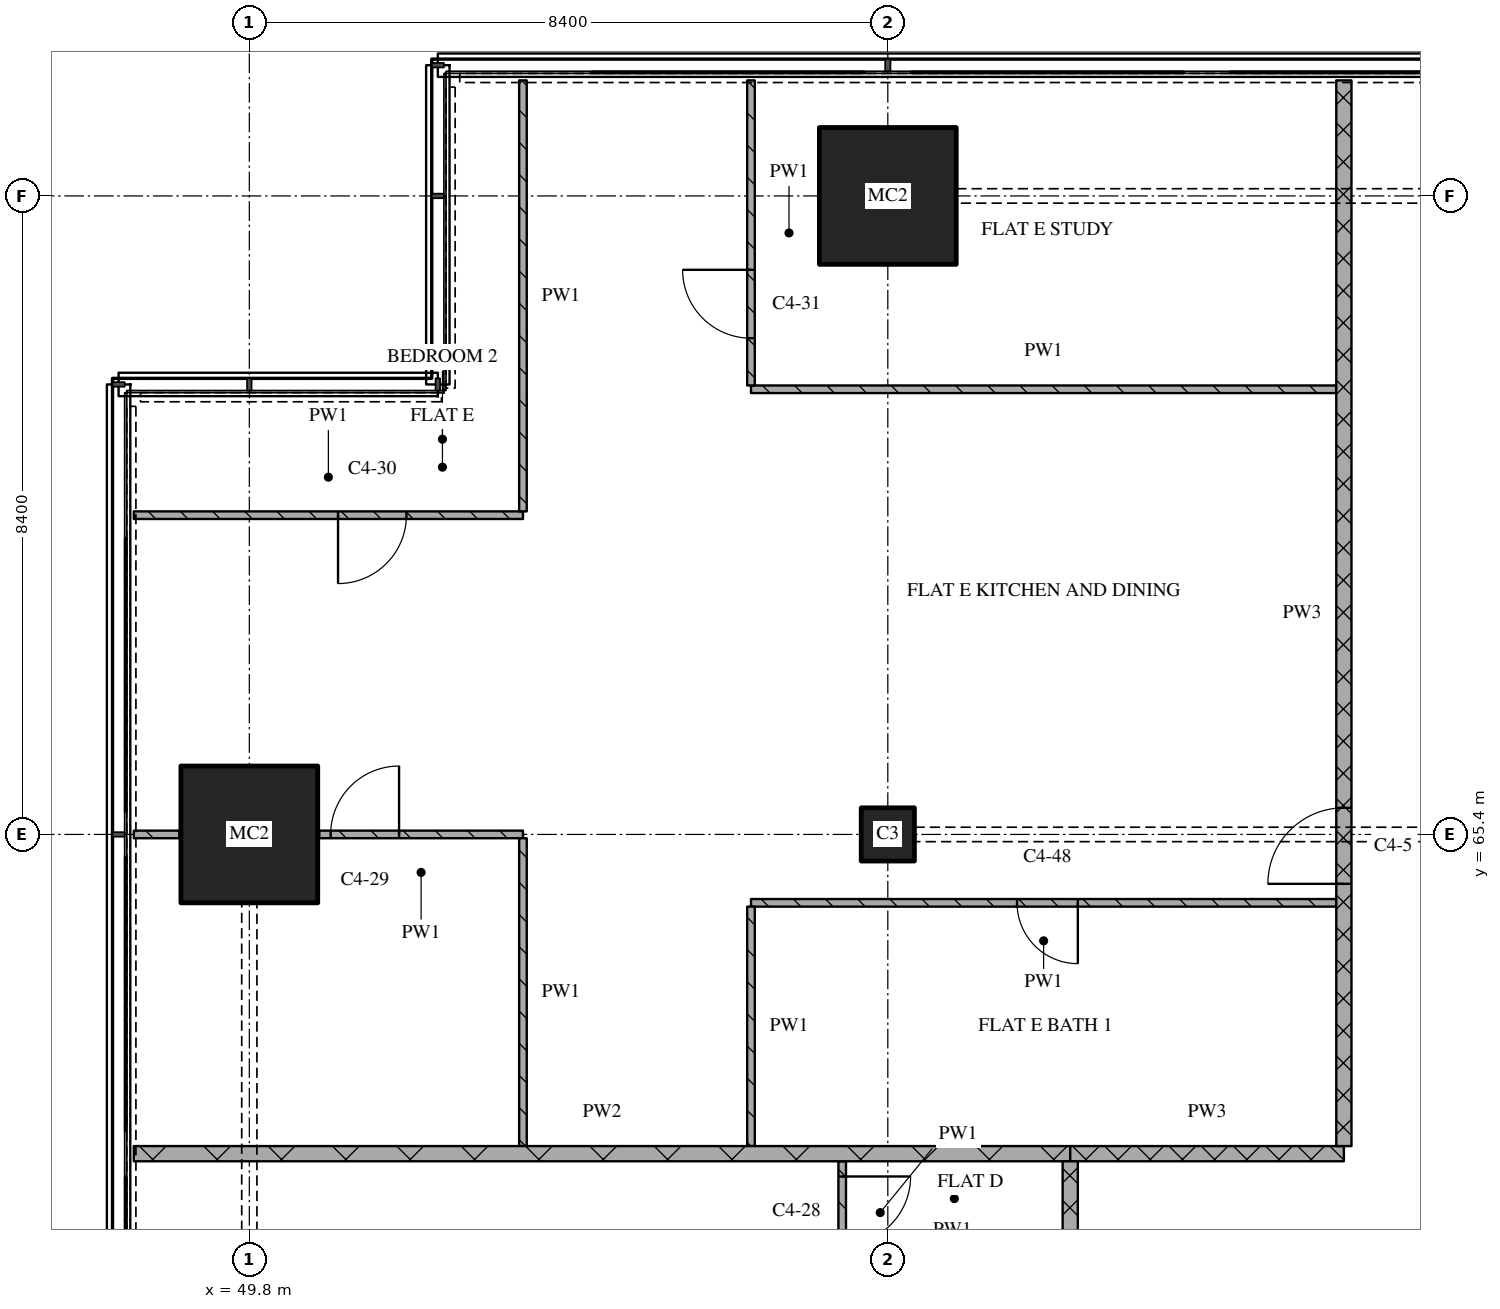
"""IFC4 building model, lengths in metres.
Left out: names, types, materials, properties, quantities, classifications, styles, units other than length and angle.
Written with IfcOpenShell. Run it as: python <this file> out.ifc"""

import sys

from ifc_helpers import new_model, si_unit, direction, frame, frame_2d, origin, origin_2d, place, context, subcontext, project, spatial, rectangle, extrude, element, fill, save


model = new_model("IFC4")
c1 = context("Model", 3, precision=1e-05, world=origin(), true_north=direction((0.0, 1.0)))
c2 = subcontext(c1, "Body", "Model", "MODEL_VIEW")
j1 = project(units=[si_unit("LENGTHUNIT", "METRE"), si_unit("PLANEANGLEUNIT", "RADIAN")], contexts=[c1])
p1 = place(None, origin())
s1 = spatial("IfcSite", under=j1, at=p1, CompositionType="ELEMENT")
p2 = place(p1, origin())
s2 = spatial("IfcBuilding", under=s1, at=p2, CompositionType="ELEMENT")
p3 = place(p2, frame((0.0, 0.0, 187.05)))
s3 = spatial("IfcBuildingStorey", under=s2, at=p3, CompositionType="ELEMENT", Elevation=187.05)
p4 = place(p3, frame((49.8, 65.4, 0.0), z_axis=(0.0, 0.0, 1.0), x_axis=(1.0, 0.0, 0.0)))
e1 = element("IfcColumn", 1, at=p4, inside=s3, PredefinedType="COLUMN", context=c2, shape_type="SweptSolid", body=[
    extrude(rectangle(XDim=1.8, YDim=1.8, at=origin_2d()), origin(), (0.0, 0.0, 1.0), 3.6),
])
p5 = place(p3, frame((58.2, 65.4, 0.0), z_axis=(0.0, 0.0, 1.0), x_axis=(1.0, 0.0, 0.0)))
e2 = element("IfcColumn", 2, at=p5, inside=s3, PredefinedType="COLUMN", context=c2, shape_type="SweptSolid", body=[
    extrude(rectangle(XDim=0.7, YDim=0.7, at=origin_2d()), origin(), (0.0, 0.0, 1.0), 3.6),
])
p6 = place(p3, frame((58.2, 73.8, 0.0), z_axis=(0.0, 0.0, 1.0), x_axis=(1.0, 0.0, 0.0)))
e3 = element("IfcColumn", 3, at=p6, inside=s3, PredefinedType="COLUMN", context=c2, shape_type="SweptSolid", body=[
    extrude(rectangle(XDim=1.8, YDim=1.8, at=origin_2d()), origin(), (0.0, 0.0, 1.0), 3.6),
])
p7 = place(p3, frame((60.6, 61.2, 0.0), z_axis=(0.0, 0.0, 1.0), x_axis=(1.0, 0.0, 0.0)))
e4 = element("IfcWall", 4, at=p7, inside=s3, PredefinedType="PARTITIONING", context=c2, shape_type="SweptSolid", body=[
    extrude(rectangle(XDim=3.6, YDim=0.2, at=frame_2d((1.8, 0.0))), origin(), (0.0, 0.0, 1.0), 3.32),
])
p8 = place(p3, frame((48.28, 61.2, 0.0), z_axis=(0.0, 0.0, 1.0), x_axis=(1.0, 0.0, 0.0)))
e5 = element("IfcWall", 5, at=p8, inside=s3, PredefinedType="PARTITIONING", context=c2, shape_type="SweptSolid", body=[
    extrude(rectangle(XDim=12.32, YDim=0.2, at=frame_2d((6.16, 0.0))), origin(), (0.0, 0.0, 1.0), 3.32),
])
p9 = place(p3, frame((64.1, 64.5, 0.0), z_axis=(0.0, 0.0, 1.0), x_axis=(-1.0, 0.0, 0.0)))
e6 = element("IfcWall", 6, at=p9, inside=s3, PredefinedType="PARTITIONING", context=c2, shape_type="SweptSolid", body=[
    extrude(rectangle(XDim=7.7, YDim=0.1, at=frame_2d((3.85, 0.0))), origin(), (0.0, 0.0, 1.0), 3.32),
])
p10 = place(p9, frame((3.4, 0.0, 0.0)))
e7 = element("IfcOpeningElement", 7, at=p10, cuts=e6, PredefinedType="OPENING", context=c2, shape_type="SweptSolid", body=[
    extrude(rectangle(XDim=0.8, YDim=2.1, at=frame_2d((0.4, 1.05))), frame((0.0, 0.06, 0.0), z_axis=(0.0, -1.0, 0.0), x_axis=(1.0, 0.0, 0.0)), (0.0, 0.0, 1.0), 0.12),
])
p11 = place(p3, frame((48.28, 65.4, 0.0), z_axis=(0.0, 0.0, 1.0), x_axis=(1.0, 0.0, 0.0)))
e8 = element("IfcWall", 8, at=p11, inside=s3, PredefinedType="PARTITIONING", context=c2, shape_type="SweptSolid", body=[
    extrude(rectangle(XDim=0.6, YDim=0.1, at=frame_2d((0.3, 0.0))), origin(), (0.0, 0.0, 1.0), 3.32),
])
p12 = place(p3, frame((53.4, 65.4, 0.0), z_axis=(0.0, 0.0, 1.0), x_axis=(-1.0, 0.0, 0.0)))
e9 = element("IfcWall", 9, at=p12, inside=s3, PredefinedType="PARTITIONING", context=c2, shape_type="SweptSolid", body=[
    extrude(rectangle(XDim=2.68, YDim=0.1, at=frame_2d((1.34, 0.0))), origin(), (0.0, 0.0, 1.0), 3.32),
])
p13 = place(p12, frame((1.63, 0.0, 0.0)))
e10 = element("IfcOpeningElement", 10, at=p13, cuts=e9, PredefinedType="OPENING", context=c2, shape_type="SweptSolid", body=[
    extrude(rectangle(XDim=0.9, YDim=2.1, at=frame_2d((0.45, 1.05))), frame((0.0, 0.06, 0.0), z_axis=(0.0, -1.0, 0.0), x_axis=(1.0, 0.0, 0.0)), (0.0, 0.0, 1.0), 0.12),
])
p14 = place(p3, frame((48.28, 69.6, 0.0), z_axis=(0.0, 0.0, 1.0), x_axis=(1.0, 0.0, 0.0)))
e11 = element("IfcWall", 11, at=p14, inside=s3, PredefinedType="PARTITIONING", context=c2, shape_type="SweptSolid", body=[
    extrude(rectangle(XDim=5.12, YDim=0.1, at=frame_2d((2.56, 0.0))), origin(), (0.0, 0.0, 1.0), 3.32),
])
p15 = place(p14, frame((2.687, 0.0, 0.0)))
e12 = element("IfcOpeningElement", 12, at=p15, cuts=e11, PredefinedType="OPENING", context=c2, shape_type="SweptSolid", body=[
    extrude(rectangle(XDim=0.9, YDim=2.1, at=frame_2d((0.45, 1.05))), frame((0.0, 0.06, 0.0), z_axis=(0.0, -1.0, 0.0), x_axis=(1.0, 0.0, 0.0)), (0.0, 0.0, 1.0), 0.12),
])
p16 = place(p3, frame((56.4, 71.256, 0.0), z_axis=(0.0, 0.0, 1.0), x_axis=(1.0, 0.0, 0.0)))
e13 = element("IfcWall", 13, at=p16, inside=s3, PredefinedType="PARTITIONING", context=c2, shape_type="SweptSolid", body=[
    extrude(rectangle(XDim=7.7, YDim=0.1, at=frame_2d((3.85, 0.0))), origin(), (0.0, 0.0, 1.0), 3.32),
])
p17 = place(p3, frame((53.4, 65.35, 0.0), z_axis=(0.0, 0.0, 1.0), x_axis=(0.0, -1.0, 0.0)))
e14 = element("IfcWall", 14, at=p17, inside=s3, PredefinedType="PARTITIONING", context=c2, shape_type="SweptSolid", body=[
    extrude(rectangle(XDim=4.05, YDim=0.1, at=frame_2d((2.025, 0.0))), origin(), (0.0, 0.0, 1.0), 3.32),
])
p18 = place(p3, frame((53.4, 75.32, 0.0), z_axis=(0.0, 0.0, 1.0), x_axis=(0.0, -1.0, 0.0)))
e15 = element("IfcWall", 15, at=p18, inside=s3, PredefinedType="PARTITIONING", context=c2, shape_type="SweptSolid", body=[
    extrude(rectangle(XDim=5.67, YDim=0.1, at=frame_2d((2.835, 0.0))), origin(), (0.0, 0.0, 1.0), 3.32),
])
p19 = place(p3, frame((56.4, 64.45, 0.0), z_axis=(0.0, 0.0, 1.0), x_axis=(0.0, -1.0, 0.0)))
e16 = element("IfcWall", 16, at=p19, inside=s3, PredefinedType="PARTITIONING", context=c2, shape_type="SweptSolid", body=[
    extrude(rectangle(XDim=3.15, YDim=0.1, at=frame_2d((1.575, 0.0))), origin(), (0.0, 0.0, 1.0), 3.32),
])
p20 = place(p3, frame((56.4, 75.32, 0.0), z_axis=(0.0, 0.0, 1.0), x_axis=(0.0, -1.0, 0.0)))
e17 = element("IfcWall", 17, at=p20, inside=s3, PredefinedType="PARTITIONING", context=c2, shape_type="SweptSolid", body=[
    extrude(rectangle(XDim=4.014, YDim=0.1, at=frame_2d((2.007, 0.0))), origin(), (0.0, 0.0, 1.0), 3.32),
])
p21 = place(p20, frame((2.492, 0.0, 0.0)))
e18 = element("IfcOpeningElement", 18, at=p21, cuts=e17, PredefinedType="OPENING", context=c2, shape_type="SweptSolid", body=[
    extrude(rectangle(XDim=0.9, YDim=2.1, at=frame_2d((0.45, 1.05))), frame((0.0, 0.06, 0.0), z_axis=(0.0, -1.0, 0.0), x_axis=(1.0, 0.0, 0.0)), (0.0, 0.0, 1.0), 0.12),
])
p22 = place(p3, frame((57.6, 61.1, 0.0), z_axis=(0.0, 0.0, 1.0), x_axis=(0.0, -1.0, 0.0)))
e19 = element("IfcWall", 19, at=p22, inside=s3, PredefinedType="PARTITIONING", context=c2, shape_type="SweptSolid", body=[
    extrude(rectangle(XDim=1.35, YDim=0.1, at=frame_2d((0.675, 0.0))), origin(), (0.0, 0.0, 1.0), 3.32),
])
p23 = place(p22, frame((0.2, 0.0, 0.0)))
e20 = element("IfcOpeningElement", 20, at=p23, cuts=e19, PredefinedType="OPENING", context=c2, shape_type="SweptSolid", body=[
    extrude(rectangle(XDim=0.9, YDim=2.1, at=frame_2d((0.45, 1.05))), frame((0.0, 0.06, 0.0), z_axis=(0.0, -1.0, 0.0), x_axis=(1.0, 0.0, 0.0)), (0.0, 0.0, 1.0), 0.12),
])
p24 = place(p3, frame((60.6, 43.3, 0.0), z_axis=(0.0, 0.0, 1.0), x_axis=(0.0, 1.0, 0.0)))
e21 = element("IfcWall", 21, at=p24, inside=s3, PredefinedType="PARTITIONING", context=c2, shape_type="SweptSolid", body=[
    extrude(rectangle(XDim=17.8, YDim=0.2, at=frame_2d((8.9, 0.0))), origin(), (0.0, 0.0, 1.0), 3.32),
])
p25 = place(p24, frame((7.65, 0.0, 0.0)))
e22 = element("IfcOpeningElement", 22, at=p25, cuts=e21, PredefinedType="OPENING", context=c2, shape_type="SweptSolid", body=[
    extrude(rectangle(XDim=1.0, YDim=2.1, at=frame_2d((0.5, 1.05))), frame((0.0, 0.11, 0.0), z_axis=(0.0, -1.0, 0.0), x_axis=(1.0, 0.0, 0.0)), (0.0, 0.0, 1.0), 0.22),
])
p26 = place(p3, frame((64.2, 61.3, 0.0), z_axis=(0.0, 0.0, 1.0), x_axis=(0.0, 1.0, 0.0)))
e23 = element("IfcWall", 23, at=p26, inside=s3, PredefinedType="PARTITIONING", context=c2, shape_type="SweptSolid", body=[
    extrude(rectangle(XDim=14.02, YDim=0.2, at=frame_2d((7.01, 0.0))), origin(), (0.0, 0.0, 1.0), 3.32),
])
p27 = place(p26, frame((3.45, 0.0, 0.0)))
e24 = element("IfcOpeningElement", 24, at=p27, cuts=e23, PredefinedType="OPENING", context=c2, shape_type="SweptSolid", body=[
    extrude(rectangle(XDim=1.0, YDim=2.1, at=frame_2d((0.5, 1.05))), frame((0.0, 0.11, 0.0), z_axis=(0.0, -1.0, 0.0), x_axis=(1.0, 0.0, 0.0)), (0.0, 0.0, 1.0), 0.22),
])
p28 = place(p10, origin())
e25 = element("IfcDoor", 25, at=p28, inside=s3, OperationType="SINGLE_SWING_LEFT", PredefinedType="DOOR", context=c2, shape_type="SweptSolid", body=[
    extrude(rectangle(XDim=0.8, YDim=2.1, at=frame_2d((0.4, 1.05))), frame((0.0, 0.025, 0.0), z_axis=(0.0, -1.0, 0.0), x_axis=(1.0, 0.0, 0.0)), (0.0, 0.0, 1.0), 0.05),
])
fill(e7, e25)
p29 = place(p13, origin())
e26 = element("IfcDoor", 26, at=p29, inside=s3, OperationType="SINGLE_SWING_RIGHT", PredefinedType="DOOR", context=c2, shape_type="SweptSolid", body=[
    extrude(rectangle(XDim=0.9, YDim=2.1, at=frame_2d((0.45, 1.05))), frame((0.0, 0.025, 0.0), z_axis=(0.0, -1.0, 0.0), x_axis=(1.0, 0.0, 0.0)), (0.0, 0.0, 1.0), 0.05),
])
fill(e10, e26)
p30 = place(p15, origin())
e27 = element("IfcDoor", 27, at=p30, inside=s3, OperationType="SINGLE_SWING_RIGHT", PredefinedType="DOOR", context=c2, shape_type="SweptSolid", body=[
    extrude(rectangle(XDim=0.9, YDim=2.1, at=frame_2d((0.45, 1.05))), frame((0.0, 0.025, 0.0), z_axis=(0.0, -1.0, 0.0), x_axis=(1.0, 0.0, 0.0)), (0.0, 0.0, 1.0), 0.05),
])
fill(e12, e27)
p31 = place(p21, origin())
e28 = element("IfcDoor", 28, at=p31, inside=s3, OperationType="SINGLE_SWING_RIGHT", PredefinedType="DOOR", context=c2, shape_type="SweptSolid", body=[
    extrude(rectangle(XDim=0.9, YDim=2.1, at=frame_2d((0.45, 1.05))), frame((0.0, 0.025, 0.0), z_axis=(0.0, -1.0, 0.0), x_axis=(1.0, 0.0, 0.0)), (0.0, 0.0, 1.0), 0.05),
])
fill(e18, e28)
p32 = place(p23, origin())
e29 = element("IfcDoor", 29, at=p32, inside=s3, OperationType="SINGLE_SWING_LEFT", PredefinedType="DOOR", context=c2, shape_type="SweptSolid", body=[
    extrude(rectangle(XDim=0.9, YDim=2.1, at=frame_2d((0.45, 1.05))), frame((0.0, 0.025, 0.0), z_axis=(0.0, -1.0, 0.0), x_axis=(1.0, 0.0, 0.0)), (0.0, 0.0, 1.0), 0.05),
])
fill(e20, e29)
p33 = place(p27, origin())
e30 = element("IfcDoor", 30, at=p33, inside=s3, OperationType="SINGLE_SWING_LEFT", PredefinedType="DOOR", context=c2, shape_type="SweptSolid", body=[
    extrude(rectangle(XDim=1.0, YDim=2.1, at=frame_2d((0.5, 1.05))), frame((0.0, 0.025, 0.0), z_axis=(0.0, -1.0, 0.0), x_axis=(1.0, 0.0, 0.0)), (0.0, 0.0, 1.0), 0.05),
])
fill(e24, e30)
save(model, sys.argv[1])
